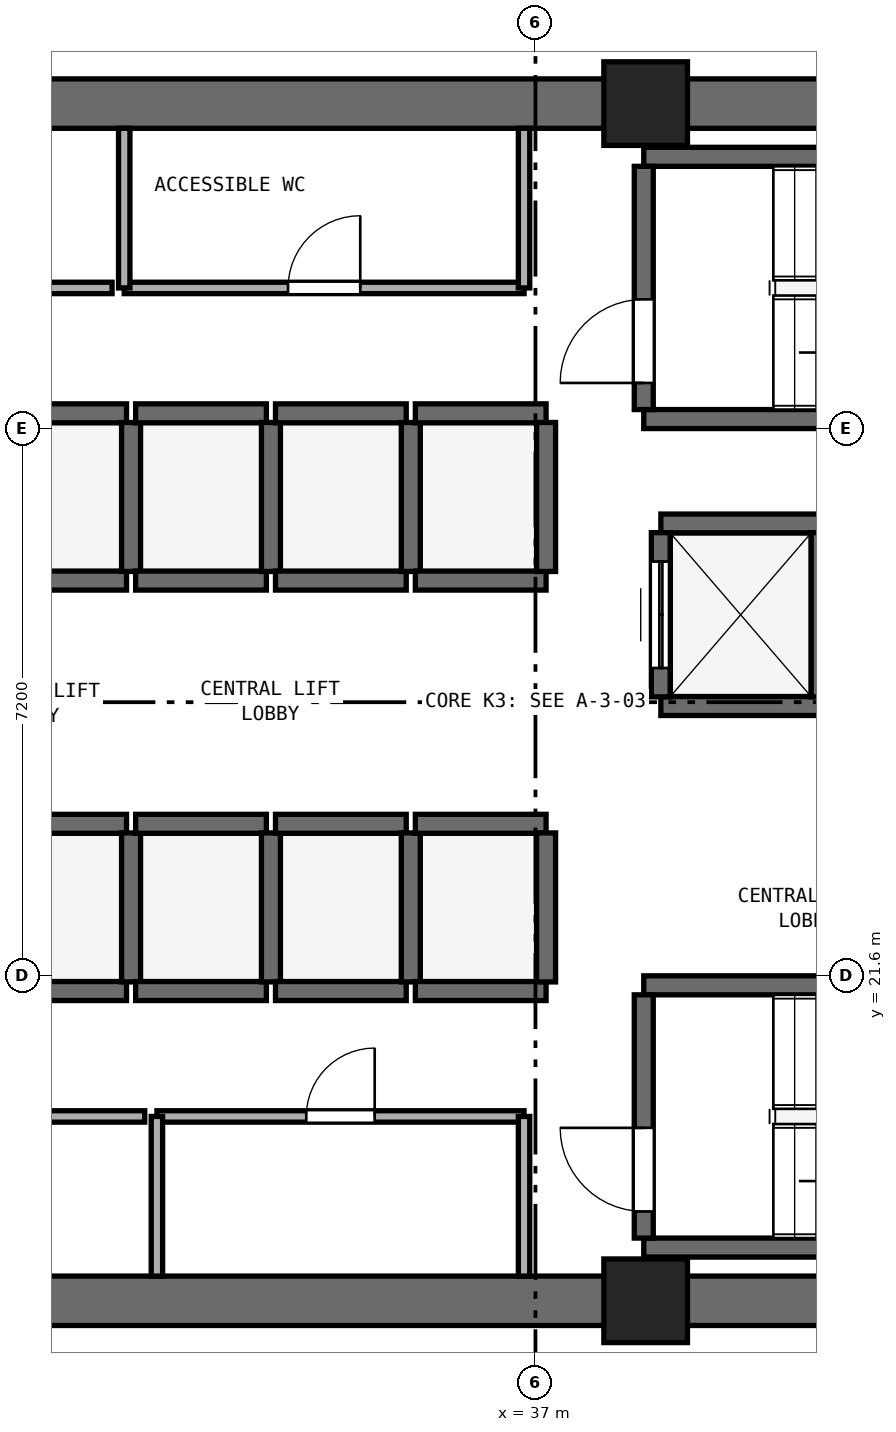
"""IFC4 building model, lengths in metres.
Left out: names, types, materials, properties, quantities, classifications, styles, units other than length and angle.
Written with IfcOpenShell. Run it as: python <this file> out.ifc"""

import sys

from ifc_helpers import new_model, si_unit, direction, frame, frame_2d, origin, origin_2d, place, context, subcontext, project, spatial, rectangle, extrude, element, fill, save


model = new_model("IFC4")
c1 = context("Model", 3, precision=1e-05, world=origin(), true_north=direction((0.0, 1.0)))
c2 = subcontext(c1, "Body", "Model", "MODEL_VIEW")
j1 = project(units=[si_unit("LENGTHUNIT", "METRE"), si_unit("PLANEANGLEUNIT", "RADIAN")], contexts=[c1])
p1 = place(None, origin())
s1 = spatial("IfcSite", under=j1, at=p1, CompositionType="ELEMENT")
p2 = place(p1, origin())
s2 = spatial("IfcBuilding", under=s1, at=p2, CompositionType="ELEMENT")
p3 = place(p2, frame((0.0, 0.0, 89.6)))
s3 = spatial("IfcBuildingStorey", under=s2, at=p3, CompositionType="ELEMENT", Elevation=89.6)
for number, where, z_axis, x_axis in (
    (1, (25.4, 17.325, 0.0), (0.0, 0.0, 1.0), (1.0, 0.0, 0.0)),
    (2, (25.4, 33.075, 0.0), (0.0, 0.0, 1.0), (1.0, 0.0, 0.0)),
):
    element("IfcWall", number, at=place(p3, frame(where, z_axis=z_axis, x_axis=x_axis)), inside=s3, PredefinedType="SHEAR", context=c2, shape_type="SweptSolid", body=[
        extrude(rectangle(XDim=23.2, YDim=0.65, at=frame_2d((11.6, 0.0))), origin(), (0.0, 0.0, 1.0), 3.525),
    ])
for number, where, z_axis, x_axis in (
    (3, (38.45, 17.325, 0.0), (0.0, 0.0, 1.0), (1.0, 0.0, 0.0)),
    (4, (38.45, 33.075, 0.0), (0.0, 0.0, 1.0), (1.0, 0.0, 0.0)),
):
    element("IfcColumn", number, at=place(p3, frame(where, z_axis=z_axis, x_axis=x_axis)), inside=s3, PredefinedType="PILASTER", context=c2, shape_type="SweptSolid", body=[
        extrude(rectangle(XDim=1.1, YDim=1.1, at=origin_2d()), origin(), (0.0, 0.0, 1.0), 3.8),
    ])
for number, where, z_axis, x_axis in (
    (5, (38.425, 28.925, 0.0), (0.0, 0.0, 1.0), (1.0, 0.0, 0.0)),
    (6, (38.425, 32.375, 0.0), (0.0, 0.0, 1.0), (1.0, 0.0, 0.0)),
):
    element("IfcWall", number, at=place(p3, frame(where, z_axis=z_axis, x_axis=x_axis)), inside=s3, PredefinedType="SHEAR", context=c2, shape_type="SweptSolid", body=[
        extrude(rectangle(XDim=7.3, YDim=0.25, at=frame_2d((3.65, 0.0))), origin(), (0.0, 0.0, 1.0), 3.525),
    ])
p4 = place(p3, frame((38.425, 29.05, 0.0), z_axis=(0.0, 0.0, 1.0), x_axis=(0.0, 1.0, 0.0)))
e7 = element("IfcWall", 7, at=p4, inside=s3, PredefinedType="SHEAR", context=c2, shape_type="SweptSolid", body=[
    extrude(rectangle(XDim=3.2, YDim=0.25, at=frame_2d((1.6, 0.0))), origin(), (0.0, 0.0, 1.0), 3.525),
])
p5 = place(p4, frame((0.35, 0.0, 0.0)))
e8 = element("IfcOpeningElement", 8, at=p5, cuts=e7, PredefinedType="OPENING", context=c2, shape_type="SweptSolid", body=[
    extrude(rectangle(XDim=1.1, YDim=2.15, at=frame_2d((0.55, 1.075))), frame((0.0, 0.135, 0.0), z_axis=(0.0, -1.0, 0.0), x_axis=(1.0, 0.0, 0.0)), (0.0, 0.0, 1.0), 0.27),
])
for number, where, z_axis, x_axis in (
    (9, (38.425, 18.025, 0.0), (0.0, 0.0, 1.0), (1.0, 0.0, 0.0)),
    (10, (38.425, 21.475, 0.0), (0.0, 0.0, 1.0), (1.0, 0.0, 0.0)),
):
    element("IfcWall", number, at=place(p3, frame(where, z_axis=z_axis, x_axis=x_axis)), inside=s3, PredefinedType="SHEAR", context=c2, shape_type="SweptSolid", body=[
        extrude(rectangle(XDim=7.3, YDim=0.25, at=frame_2d((3.65, 0.0))), origin(), (0.0, 0.0, 1.0), 3.525),
    ])
p6 = place(p3, frame((38.425, 18.15, 0.0), z_axis=(0.0, 0.0, 1.0), x_axis=(0.0, 1.0, 0.0)))
e11 = element("IfcWall", 11, at=p6, inside=s3, PredefinedType="SHEAR", context=c2, shape_type="SweptSolid", body=[
    extrude(rectangle(XDim=3.2, YDim=0.25, at=frame_2d((1.6, 0.0))), origin(), (0.0, 0.0, 1.0), 3.525),
])
p7 = place(p6, frame((0.35, 0.0, 0.0)))
e12 = element("IfcOpeningElement", 12, at=p7, cuts=e11, PredefinedType="OPENING", context=c2, shape_type="SweptSolid", body=[
    extrude(rectangle(XDim=1.1, YDim=2.15, at=frame_2d((0.55, 1.075))), frame((0.0, 0.135, 0.0), z_axis=(0.0, -1.0, 0.0), x_axis=(1.0, 0.0, 0.0)), (0.0, 0.0, 1.0), 0.27),
])
for number, where, z_axis, x_axis in (
    (13, (29.9, 21.4, 0.0), (0.0, 0.0, 1.0), (1.0, 0.0, 0.0)),
    (14, (29.9, 23.6, 0.0), (0.0, 0.0, 1.0), (1.0, 0.0, 0.0)),
):
    element("IfcWall", number, at=place(p3, frame(where, z_axis=z_axis, x_axis=x_axis)), inside=s3, PredefinedType="SHEAR", context=c2, shape_type="SweptSolid", body=[
        extrude(rectangle(XDim=1.72, YDim=0.25, at=frame_2d((0.86, 0.0))), origin(), (0.0, 0.0, 1.0), 3.525),
    ])
p8 = place(p3, frame((31.68, 21.52, 0.0), z_axis=(0.0, 0.0, 1.0), x_axis=(0.0, 1.0, 0.0)))
e15 = element("IfcWall", 15, at=p8, inside=s3, PredefinedType="SHEAR", context=c2, shape_type="SweptSolid", body=[
    extrude(rectangle(XDim=1.96, YDim=0.25, at=frame_2d((0.98, 0.0))), origin(), (0.0, 0.0, 1.0), 3.525),
])
for number, where, z_axis, x_axis in (
    (16, (31.74, 21.4, 0.0), (0.0, 0.0, 1.0), (1.0, 0.0, 0.0)),
    (17, (31.74, 23.6, 0.0), (0.0, 0.0, 1.0), (1.0, 0.0, 0.0)),
):
    element("IfcWall", number, at=place(p3, frame(where, z_axis=z_axis, x_axis=x_axis)), inside=s3, PredefinedType="SHEAR", context=c2, shape_type="SweptSolid", body=[
        extrude(rectangle(XDim=1.72, YDim=0.25, at=frame_2d((0.86, 0.0))), origin(), (0.0, 0.0, 1.0), 3.525),
    ])
p9 = place(p3, frame((33.52, 21.52, 0.0), z_axis=(0.0, 0.0, 1.0), x_axis=(0.0, 1.0, 0.0)))
e18 = element("IfcWall", 18, at=p9, inside=s3, PredefinedType="SHEAR", context=c2, shape_type="SweptSolid", body=[
    extrude(rectangle(XDim=1.96, YDim=0.25, at=frame_2d((0.98, 0.0))), origin(), (0.0, 0.0, 1.0), 3.525),
])
for number, where, z_axis, x_axis in (
    (19, (33.58, 21.4, 0.0), (0.0, 0.0, 1.0), (1.0, 0.0, 0.0)),
    (20, (33.58, 23.6, 0.0), (0.0, 0.0, 1.0), (1.0, 0.0, 0.0)),
):
    element("IfcWall", number, at=place(p3, frame(where, z_axis=z_axis, x_axis=x_axis)), inside=s3, PredefinedType="SHEAR", context=c2, shape_type="SweptSolid", body=[
        extrude(rectangle(XDim=1.72, YDim=0.25, at=frame_2d((0.86, 0.0))), origin(), (0.0, 0.0, 1.0), 3.525),
    ])
p10 = place(p3, frame((35.36, 21.52, 0.0), z_axis=(0.0, 0.0, 1.0), x_axis=(0.0, 1.0, 0.0)))
e21 = element("IfcWall", 21, at=p10, inside=s3, PredefinedType="SHEAR", context=c2, shape_type="SweptSolid", body=[
    extrude(rectangle(XDim=1.96, YDim=0.25, at=frame_2d((0.98, 0.0))), origin(), (0.0, 0.0, 1.0), 3.525),
])
for number, where, z_axis, x_axis in (
    (22, (35.42, 21.4, 0.0), (0.0, 0.0, 1.0), (1.0, 0.0, 0.0)),
    (23, (35.42, 23.6, 0.0), (0.0, 0.0, 1.0), (1.0, 0.0, 0.0)),
):
    element("IfcWall", number, at=place(p3, frame(where, z_axis=z_axis, x_axis=x_axis)), inside=s3, PredefinedType="SHEAR", context=c2, shape_type="SweptSolid", body=[
        extrude(rectangle(XDim=1.72, YDim=0.25, at=frame_2d((0.86, 0.0))), origin(), (0.0, 0.0, 1.0), 3.525),
    ])
p11 = place(p3, frame((37.14, 21.52, 0.0), z_axis=(0.0, 0.0, 1.0), x_axis=(0.0, 1.0, 0.0)))
e24 = element("IfcWall", 24, at=p11, inside=s3, PredefinedType="SHEAR", context=c2, shape_type="SweptSolid", body=[
    extrude(rectangle(XDim=1.96, YDim=0.25, at=frame_2d((0.98, 0.0))), origin(), (0.0, 0.0, 1.0), 3.525),
])
for number, where, z_axis, x_axis in (
    (25, (29.9, 26.8, 0.0), (0.0, 0.0, 1.0), (1.0, 0.0, 0.0)),
    (26, (29.9, 29.0, 0.0), (0.0, 0.0, 1.0), (1.0, 0.0, 0.0)),
):
    element("IfcWall", number, at=place(p3, frame(where, z_axis=z_axis, x_axis=x_axis)), inside=s3, PredefinedType="SHEAR", context=c2, shape_type="SweptSolid", body=[
        extrude(rectangle(XDim=1.72, YDim=0.25, at=frame_2d((0.86, 0.0))), origin(), (0.0, 0.0, 1.0), 3.525),
    ])
p12 = place(p3, frame((31.68, 26.92, 0.0), z_axis=(0.0, 0.0, 1.0), x_axis=(0.0, 1.0, 0.0)))
e27 = element("IfcWall", 27, at=p12, inside=s3, PredefinedType="SHEAR", context=c2, shape_type="SweptSolid", body=[
    extrude(rectangle(XDim=1.96, YDim=0.25, at=frame_2d((0.98, 0.0))), origin(), (0.0, 0.0, 1.0), 3.525),
])
for number, where, z_axis, x_axis in (
    (28, (31.74, 26.8, 0.0), (0.0, 0.0, 1.0), (1.0, 0.0, 0.0)),
    (29, (31.74, 29.0, 0.0), (0.0, 0.0, 1.0), (1.0, 0.0, 0.0)),
):
    element("IfcWall", number, at=place(p3, frame(where, z_axis=z_axis, x_axis=x_axis)), inside=s3, PredefinedType="SHEAR", context=c2, shape_type="SweptSolid", body=[
        extrude(rectangle(XDim=1.72, YDim=0.25, at=frame_2d((0.86, 0.0))), origin(), (0.0, 0.0, 1.0), 3.525),
    ])
p13 = place(p3, frame((33.52, 26.92, 0.0), z_axis=(0.0, 0.0, 1.0), x_axis=(0.0, 1.0, 0.0)))
e30 = element("IfcWall", 30, at=p13, inside=s3, PredefinedType="SHEAR", context=c2, shape_type="SweptSolid", body=[
    extrude(rectangle(XDim=1.96, YDim=0.25, at=frame_2d((0.98, 0.0))), origin(), (0.0, 0.0, 1.0), 3.525),
])
for number, where, z_axis, x_axis in (
    (31, (33.58, 26.8, 0.0), (0.0, 0.0, 1.0), (1.0, 0.0, 0.0)),
    (32, (33.58, 29.0, 0.0), (0.0, 0.0, 1.0), (1.0, 0.0, 0.0)),
):
    element("IfcWall", number, at=place(p3, frame(where, z_axis=z_axis, x_axis=x_axis)), inside=s3, PredefinedType="SHEAR", context=c2, shape_type="SweptSolid", body=[
        extrude(rectangle(XDim=1.72, YDim=0.25, at=frame_2d((0.86, 0.0))), origin(), (0.0, 0.0, 1.0), 3.525),
    ])
p14 = place(p3, frame((35.36, 26.92, 0.0), z_axis=(0.0, 0.0, 1.0), x_axis=(0.0, 1.0, 0.0)))
e33 = element("IfcWall", 33, at=p14, inside=s3, PredefinedType="SHEAR", context=c2, shape_type="SweptSolid", body=[
    extrude(rectangle(XDim=1.96, YDim=0.25, at=frame_2d((0.98, 0.0))), origin(), (0.0, 0.0, 1.0), 3.525),
])
for number, where, z_axis, x_axis in (
    (34, (35.42, 26.8, 0.0), (0.0, 0.0, 1.0), (1.0, 0.0, 0.0)),
    (35, (35.42, 29.0, 0.0), (0.0, 0.0, 1.0), (1.0, 0.0, 0.0)),
):
    element("IfcWall", number, at=place(p3, frame(where, z_axis=z_axis, x_axis=x_axis)), inside=s3, PredefinedType="SHEAR", context=c2, shape_type="SweptSolid", body=[
        extrude(rectangle(XDim=1.72, YDim=0.25, at=frame_2d((0.86, 0.0))), origin(), (0.0, 0.0, 1.0), 3.525),
    ])
p15 = place(p3, frame((37.14, 26.92, 0.0), z_axis=(0.0, 0.0, 1.0), x_axis=(0.0, 1.0, 0.0)))
e36 = element("IfcWall", 36, at=p15, inside=s3, PredefinedType="SHEAR", context=c2, shape_type="SweptSolid", body=[
    extrude(rectangle(XDim=1.96, YDim=0.25, at=frame_2d((0.98, 0.0))), origin(), (0.0, 0.0, 1.0), 3.525),
])
for number, where, z_axis, x_axis in (
    (37, (38.65, 25.15, 0.0), (0.0, 0.0, 1.0), (1.0, 0.0, 0.0)),
    (38, (38.65, 27.55, 0.0), (0.0, 0.0, 1.0), (1.0, 0.0, 0.0)),
):
    element("IfcWall", number, at=place(p3, frame(where, z_axis=z_axis, x_axis=x_axis)), inside=s3, PredefinedType="SHEAR", context=c2, shape_type="SweptSolid", body=[
        extrude(rectangle(XDim=2.1, YDim=0.25, at=frame_2d((1.05, 0.0))), origin(), (0.0, 0.0, 1.0), 3.525),
    ])
p16 = place(p3, frame((38.65, 25.27, 0.0), z_axis=(0.0, 0.0, 1.0), x_axis=(0.0, 1.0, 0.0)))
e39 = element("IfcWall", 39, at=p16, inside=s3, PredefinedType="SHEAR", context=c2, shape_type="SweptSolid", body=[
    extrude(rectangle(XDim=2.16, YDim=0.25, at=frame_2d((1.08, 0.0))), origin(), (0.0, 0.0, 1.0), 3.525),
])
p17 = place(p16, frame((0.38, 0.0, 0.0)))
e40 = element("IfcOpeningElement", 40, at=p17, cuts=e39, PredefinedType="OPENING", context=c2, shape_type="SweptSolid", body=[
    extrude(rectangle(XDim=1.4, YDim=2.2, at=frame_2d((0.7, 1.1))), frame((0.0, 0.135, 0.0), z_axis=(0.0, -1.0, 0.0), x_axis=(1.0, 0.0, 0.0)), (0.0, 0.0, 1.0), 0.27),
])
p18 = place(p3, frame((40.75, 25.27, 0.0), z_axis=(0.0, 0.0, 1.0), x_axis=(0.0, 1.0, 0.0)))
e41 = element("IfcWall", 41, at=p18, inside=s3, PredefinedType="SHEAR", context=c2, shape_type="SweptSolid", body=[
    extrude(rectangle(XDim=2.16, YDim=0.25, at=frame_2d((1.08, 0.0))), origin(), (0.0, 0.0, 1.0), 3.525),
])
p19 = place(p3, frame((26.17, 30.65, 0.0), z_axis=(0.0, 0.0, 1.0), x_axis=(1.0, 0.0, 0.0)))
e42 = element("IfcWall", 42, at=p19, inside=s3, PredefinedType="PARTITIONING", context=c2, shape_type="SweptSolid", body=[
    extrude(rectangle(XDim=5.26, YDim=0.15, at=frame_2d((2.63, 0.0))), origin(), (0.0, 0.0, 1.0), 3.525),
])
p20 = place(p19, frame((2.155, 0.0, 0.0)))
e43 = element("IfcOpeningElement", 43, at=p20, cuts=e42, PredefinedType="OPENING", context=c2, shape_type="SweptSolid", body=[
    extrude(rectangle(XDim=0.95, YDim=2.1, at=frame_2d((0.475, 1.05))), frame((0.0, 0.085, 0.0), z_axis=(0.0, -1.0, 0.0), x_axis=(1.0, 0.0, 0.0)), (0.0, 0.0, 1.0), 0.17),
])
p21 = place(p3, frame((31.59, 30.65, 0.0), z_axis=(0.0, 0.0, 1.0), x_axis=(1.0, 0.0, 0.0)))
e44 = element("IfcWall", 44, at=p21, inside=s3, PredefinedType="PARTITIONING", context=c2, shape_type="SweptSolid", body=[
    extrude(rectangle(XDim=5.26, YDim=0.15, at=frame_2d((2.63, 0.0))), origin(), (0.0, 0.0, 1.0), 3.525),
])
p22 = place(p21, frame((2.155, 0.0, 0.0)))
e45 = element("IfcOpeningElement", 45, at=p22, cuts=e44, PredefinedType="OPENING", context=c2, shape_type="SweptSolid", body=[
    extrude(rectangle(XDim=0.95, YDim=2.1, at=frame_2d((0.475, 1.05))), frame((0.0, 0.085, 0.0), z_axis=(0.0, -1.0, 0.0), x_axis=(1.0, 0.0, 0.0)), (0.0, 0.0, 1.0), 0.17),
])
for number, where, z_axis, x_axis in (
    (46, (31.59, 30.65, 0.0), (0.0, 0.0, 1.0), (0.0, 1.0, 0.0)),
    (47, (36.85, 30.65, 0.0), (0.0, 0.0, 1.0), (0.0, 1.0, 0.0)),
):
    element("IfcWall", number, at=place(p3, frame(where, z_axis=z_axis, x_axis=x_axis)), inside=s3, PredefinedType="PARTITIONING", context=c2, shape_type="SweptSolid", body=[
        extrude(rectangle(XDim=2.1, YDim=0.15, at=frame_2d((1.05, 0.0))), origin(), (0.0, 0.0, 1.0), 3.525),
    ])
p23 = place(p3, frame((26.17, 19.75, 0.0), z_axis=(0.0, 0.0, 1.0), x_axis=(1.0, 0.0, 0.0)))
e48 = element("IfcWall", 48, at=p23, inside=s3, PredefinedType="PARTITIONING", context=c2, shape_type="SweptSolid", body=[
    extrude(rectangle(XDim=5.69, YDim=0.15, at=frame_2d((2.845, 0.0))), origin(), (0.0, 0.0, 1.0), 3.525),
])
p24 = place(p23, frame((2.37, 0.0, 0.0)))
e49 = element("IfcOpeningElement", 49, at=p24, cuts=e48, PredefinedType="OPENING", context=c2, shape_type="SweptSolid", body=[
    extrude(rectangle(XDim=0.95, YDim=2.1, at=frame_2d((0.475, 1.05))), frame((0.0, 0.085, 0.0), z_axis=(0.0, -1.0, 0.0), x_axis=(1.0, 0.0, 0.0)), (0.0, 0.0, 1.0), 0.17),
])
p25 = place(p3, frame((32.02, 19.75, 0.0), z_axis=(0.0, 0.0, 1.0), x_axis=(1.0, 0.0, 0.0)))
e50 = element("IfcWall", 50, at=p25, inside=s3, PredefinedType="PARTITIONING", context=c2, shape_type="SweptSolid", body=[
    extrude(rectangle(XDim=4.83, YDim=0.15, at=frame_2d((2.415, 0.0))), origin(), (0.0, 0.0, 1.0), 3.525),
])
p26 = place(p25, frame((1.965, 0.0, 0.0)))
e51 = element("IfcOpeningElement", 51, at=p26, cuts=e50, PredefinedType="OPENING", context=c2, shape_type="SweptSolid", body=[
    extrude(rectangle(XDim=0.9, YDim=2.1, at=frame_2d((0.45, 1.05))), frame((0.0, 0.085, 0.0), z_axis=(0.0, -1.0, 0.0), x_axis=(1.0, 0.0, 0.0)), (0.0, 0.0, 1.0), 0.17),
])
for number, where, z_axis, x_axis in (
    (52, (32.02, 17.65, 0.0), (0.0, 0.0, 1.0), (0.0, 1.0, 0.0)),
    (53, (36.85, 17.65, 0.0), (0.0, 0.0, 1.0), (0.0, 1.0, 0.0)),
):
    element("IfcWall", number, at=place(p3, frame(where, z_axis=z_axis, x_axis=x_axis)), inside=s3, PredefinedType="PARTITIONING", context=c2, shape_type="SweptSolid", body=[
        extrude(rectangle(XDim=2.1, YDim=0.15, at=frame_2d((1.05, 0.0))), origin(), (0.0, 0.0, 1.0), 3.525),
    ])
p27 = place(p5, origin())
e54 = element("IfcDoor", 54, at=p27, inside=s3, OperationType="SINGLE_SWING_LEFT", PredefinedType="DOOR", context=c2, shape_type="SweptSolid", body=[
    extrude(rectangle(XDim=1.1, YDim=2.15, at=frame_2d((0.55, 1.075))), frame((0.0, 0.025, 0.0), z_axis=(0.0, -1.0, 0.0), x_axis=(1.0, 0.0, 0.0)), (0.0, 0.0, 1.0), 0.05),
])
fill(e8, e54)
p28 = place(p7, origin())
e55 = element("IfcDoor", 55, at=p28, inside=s3, OperationType="SINGLE_SWING_RIGHT", PredefinedType="DOOR", context=c2, shape_type="SweptSolid", body=[
    extrude(rectangle(XDim=1.1, YDim=2.15, at=frame_2d((0.55, 1.075))), frame((0.0, 0.025, 0.0), z_axis=(0.0, -1.0, 0.0), x_axis=(1.0, 0.0, 0.0)), (0.0, 0.0, 1.0), 0.05),
])
fill(e12, e55)
p29 = place(p17, origin())
e56 = element("IfcDoor", 56, at=p29, inside=s3, OperationType="DOUBLE_DOOR_SLIDING", PredefinedType="DOOR", context=c2, shape_type="SweptSolid", body=[
    extrude(rectangle(XDim=1.4, YDim=2.2, at=frame_2d((0.7, 1.1))), frame((0.0, 0.025, 0.0), z_axis=(0.0, -1.0, 0.0), x_axis=(1.0, 0.0, 0.0)), (0.0, 0.0, 1.0), 0.05),
])
fill(e40, e56)
p30 = place(p22, origin())
e57 = element("IfcDoor", 57, at=p30, inside=s3, OperationType="SINGLE_SWING_RIGHT", PredefinedType="DOOR", context=c2, shape_type="SweptSolid", body=[
    extrude(rectangle(XDim=0.95, YDim=2.1, at=frame_2d((0.475, 1.05))), frame((0.0, 0.025, 0.0), z_axis=(0.0, -1.0, 0.0), x_axis=(1.0, 0.0, 0.0)), (0.0, 0.0, 1.0), 0.05),
])
fill(e45, e57)
p31 = place(p26, origin())
e58 = element("IfcDoor", 58, at=p31, inside=s3, OperationType="SINGLE_SWING_RIGHT", PredefinedType="DOOR", context=c2, shape_type="SweptSolid", body=[
    extrude(rectangle(XDim=0.9, YDim=2.1, at=frame_2d((0.45, 1.05))), frame((0.0, 0.025, 0.0), z_axis=(0.0, -1.0, 0.0), x_axis=(1.0, 0.0, 0.0)), (0.0, 0.0, 1.0), 0.05),
])
fill(e51, e58)
save(model, sys.argv[1])
